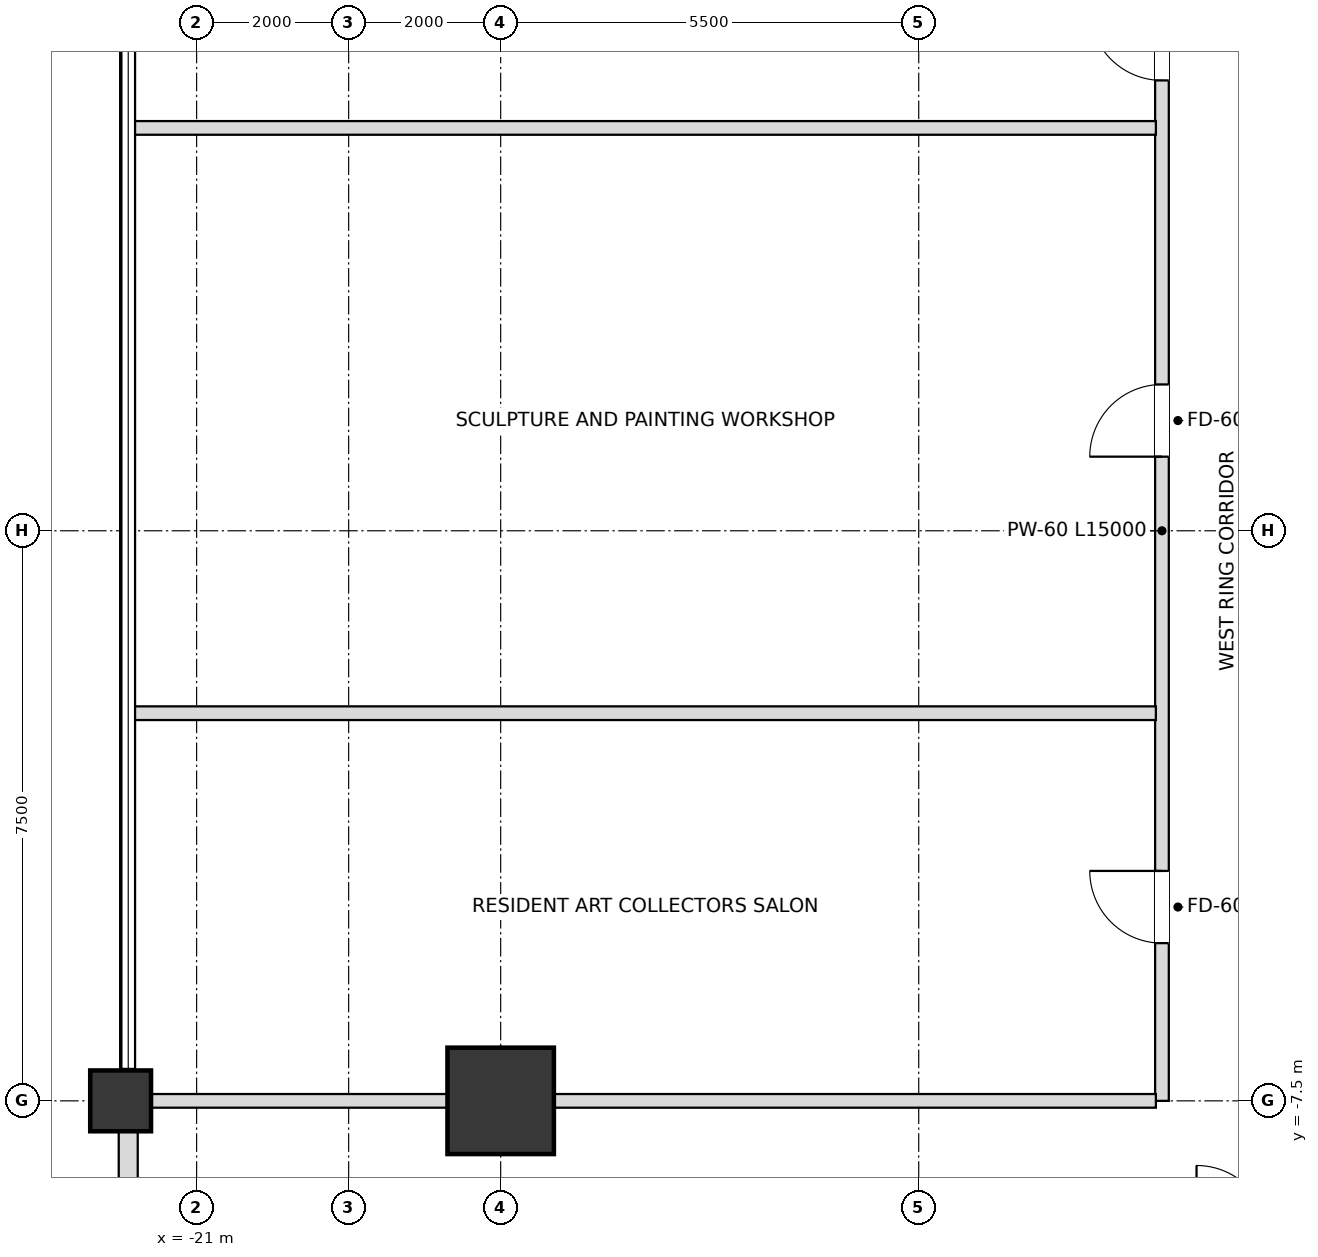
"""IFC4 building model, lengths in metres.
Left out: names, types, materials, properties, quantities, classifications, styles, units other than length and angle.
Written with IfcOpenShell. Run it as: python <this file> out.ifc"""

import sys

from ifc_helpers import new_model, si_unit, direction, frame, frame_2d, origin, origin_2d, place, context, subcontext, project, spatial, rectangle, extrude, element, fill, save


model = new_model("IFC4")
c1 = context("Model", 3, precision=1e-05, world=origin(), true_north=direction((0.0, 1.0)))
c2 = subcontext(c1, "Body", "Model", "MODEL_VIEW")
j1 = project(units=[si_unit("LENGTHUNIT", "METRE"), si_unit("PLANEANGLEUNIT", "RADIAN")], contexts=[c1])
p1 = place(None, origin())
s1 = spatial("IfcSite", under=j1, at=p1, CompositionType="ELEMENT")
p2 = place(p1, origin())
s2 = spatial("IfcBuilding", under=s1, at=p2, CompositionType="ELEMENT")
p3 = place(p2, frame((0.0, 0.0, 86.4)))
s3 = spatial("IfcBuildingStorey", under=s2, at=p3, CompositionType="ELEMENT", Elevation=86.4)
p4 = place(p3, frame((-17.0, -7.5, 0.0), z_axis=(0.0, 0.0, 1.0), x_axis=(1.0, 0.0, 0.0)))
e1 = element("IfcColumn", 1, at=p4, inside=s3, PredefinedType="USERDEFINED", context=c2, shape_type="SweptSolid", body=[
    extrude(rectangle(XDim=1.4, YDim=1.4, at=origin_2d()), origin(), (0.0, 0.0, 1.0), 3.6),
])
p5 = place(p3, frame((-22.0, -7.5, 0.0), z_axis=(0.0, 0.0, 1.0), x_axis=(1.0, 0.0, 0.0)))
e2 = element("IfcColumn", 2, at=p5, inside=s3, PredefinedType="COLUMN", context=c2, shape_type="SweptSolid", body=[
    extrude(rectangle(XDim=0.8, YDim=0.8, at=origin_2d()), origin(), (0.0, 0.0, 1.0), 3.6),
])
p6 = place(p3, frame((-21.9, -7.895, 0.0), z_axis=(0.0, 0.0, 1.0), x_axis=(0.0, -1.0, 0.0)))
e3 = element("IfcWall", 3, at=p6, inside=s3, PredefinedType="SOLIDWALL", context=c2, shape_type="SweptSolid", body=[
    extrude(rectangle(XDim=4.71, YDim=0.25, at=frame_2d((2.355, 0.0))), origin(), (0.0, 0.0, 1.0), 2.736),
])
p7 = place(p6, frame((1.455, 0.0, 0.72)))
e4 = element("IfcOpeningElement", 4, at=p7, cuts=e3, PredefinedType="OPENING", context=c2, shape_type="SweptSolid", body=[
    extrude(rectangle(XDim=1.8, YDim=1.68, at=frame_2d((0.9, 0.84))), frame((0.0, 0.135, 0.0), z_axis=(0.0, -1.0, 0.0), x_axis=(1.0, 0.0, 0.0)), (0.0, 0.0, 1.0), 0.27),
])
p8 = place(p3, frame((-8.3, -7.5, 0.0), z_axis=(0.0, 0.0, 1.0), x_axis=(0.0, 1.0, 0.0)))
e5 = element("IfcWall", 5, at=p8, inside=s3, PredefinedType="PARTITIONING", context=c2, shape_type="SweptSolid", body=[
    extrude(rectangle(XDim=15.0, YDim=0.18, at=frame_2d((7.5, 0.0))), origin(), (0.0, 0.0, 1.0), 3.38),
])
p9 = place(p8, frame((2.075, 0.0, 0.0)))
e6 = element("IfcOpeningElement", 6, at=p9, cuts=e5, PredefinedType="OPENING", context=c2, shape_type="SweptSolid", body=[
    extrude(rectangle(XDim=0.95, YDim=2.15, at=frame_2d((0.475, 1.075))), frame((0.0, 0.1, 0.0), z_axis=(0.0, -1.0, 0.0), x_axis=(1.0, 0.0, 0.0)), (0.0, 0.0, 1.0), 0.2),
])
p10 = place(p8, frame((8.475, 0.0, 0.0)))
e7 = element("IfcOpeningElement", 7, at=p10, cuts=e5, PredefinedType="OPENING", context=c2, shape_type="SweptSolid", body=[
    extrude(rectangle(XDim=0.95, YDim=2.15, at=frame_2d((0.475, 1.075))), frame((0.0, 0.1, 0.0), z_axis=(0.0, -1.0, 0.0), x_axis=(1.0, 0.0, 0.0)), (0.0, 0.0, 1.0), 0.2),
])
p11 = place(p8, frame((13.425, 0.0, 0.0)))
e8 = element("IfcOpeningElement", 8, at=p11, cuts=e5, PredefinedType="OPENING", context=c2, shape_type="SweptSolid", body=[
    extrude(rectangle(XDim=0.95, YDim=2.15, at=frame_2d((0.475, 1.075))), frame((0.0, 0.1, 0.0), z_axis=(0.0, -1.0, 0.0), x_axis=(1.0, 0.0, 0.0)), (0.0, 0.0, 1.0), 0.2),
])
p12 = place(p3, frame((-21.9, -7.5, 0.0), z_axis=(0.0, 0.0, 1.0), x_axis=(1.0, 0.0, 0.0)))
e9 = element("IfcWall", 9, at=p12, inside=s3, PredefinedType="PARTITIONING", context=c2, shape_type="SweptSolid", body=[
    extrude(rectangle(XDim=13.52, YDim=0.18, at=frame_2d((6.76, 0.0))), origin(), (0.0, 0.0, 1.0), 2.816),
])
for number, where, z_axis, x_axis in (
    (10, (-21.82, -2.4, 0.0), (0.0, 0.0, 1.0), (1.0, 0.0, 0.0)),
    (11, (-21.82, 5.3, 0.0), (0.0, 0.0, 1.0), (1.0, 0.0, 0.0)),
):
    element("IfcWall", number, at=place(p3, frame(where, z_axis=z_axis, x_axis=x_axis)), inside=s3, PredefinedType="PARTITIONING", context=c2, shape_type="SweptSolid", body=[
        extrude(rectangle(XDim=13.44, YDim=0.18, at=frame_2d((6.72, 0.0))), origin(), (0.0, 0.0, 1.0), 2.816),
    ])
p13 = place(p9, origin())
e12 = element("IfcDoor", 12, at=p13, inside=s3, OperationType="SINGLE_SWING_RIGHT", PredefinedType="DOOR", context=c2, shape_type="SweptSolid", body=[
    extrude(rectangle(XDim=0.95, YDim=2.15, at=frame_2d((0.475, 1.075))), frame((0.0, 0.025, 0.0), z_axis=(0.0, -1.0, 0.0), x_axis=(1.0, 0.0, 0.0)), (0.0, 0.0, 1.0), 0.05),
])
fill(e6, e12)
p14 = place(p10, origin())
e13 = element("IfcDoor", 13, at=p14, inside=s3, OperationType="SINGLE_SWING_LEFT", PredefinedType="DOOR", context=c2, shape_type="SweptSolid", body=[
    extrude(rectangle(XDim=0.95, YDim=2.15, at=frame_2d((0.475, 1.075))), frame((0.0, 0.025, 0.0), z_axis=(0.0, -1.0, 0.0), x_axis=(1.0, 0.0, 0.0)), (0.0, 0.0, 1.0), 0.05),
])
fill(e7, e13)
p15 = place(p11, origin())
e14 = element("IfcDoor", 14, at=p15, inside=s3, OperationType="SINGLE_SWING_RIGHT", PredefinedType="DOOR", context=c2, shape_type="SweptSolid", body=[
    extrude(rectangle(XDim=0.95, YDim=2.15, at=frame_2d((0.475, 1.075))), frame((0.0, 0.025, 0.0), z_axis=(0.0, -1.0, 0.0), x_axis=(1.0, 0.0, 0.0)), (0.0, 0.0, 1.0), 0.05),
])
fill(e8, e14)
save(model, sys.argv[1])
